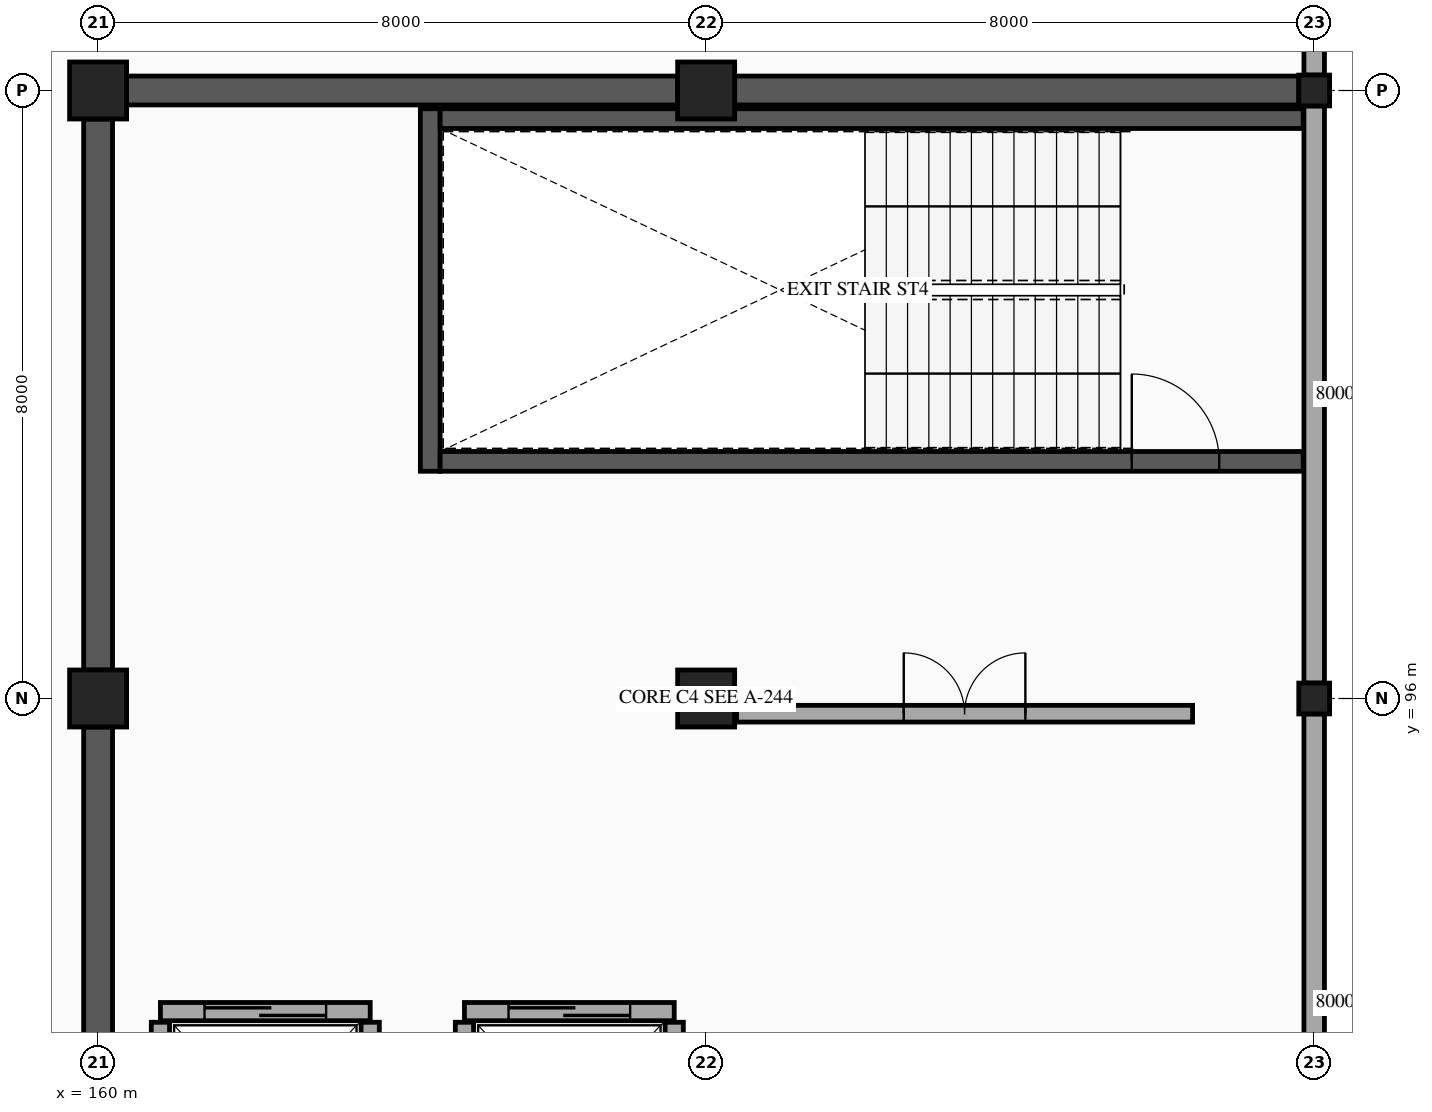
"""IFC4 building model, lengths in metres.
Left out: names, types, materials, properties, quantities, classifications, styles, units other than length and angle.
Written with IfcOpenShell. Run it as: python <this file> out.ifc"""

import sys

from ifc_helpers import new_model, si_unit, direction, frame, frame_2d, origin, origin_2d, place, context, subcontext, project, spatial, rectangle, hollow_rectangle, extrude, element, fill, save


model = new_model("IFC4")
c1 = context("Model", 3, precision=1e-05, world=origin(), true_north=direction((0.0, 1.0)))
c2 = subcontext(c1, "Body", "Model", "MODEL_VIEW")
j1 = project(units=[si_unit("LENGTHUNIT", "METRE"), si_unit("PLANEANGLEUNIT", "RADIAN")], contexts=[c1])
p1 = place(None, origin())
s1 = spatial("IfcSite", under=j1, at=p1, CompositionType="ELEMENT")
p2 = place(p1, origin())
s2 = spatial("IfcBuilding", under=s1, at=p2, CompositionType="ELEMENT")
p3 = place(p2, frame((0.0, 0.0, 28.4)))
s3 = spatial("IfcBuildingStorey", under=s2, at=p3, CompositionType="ELEMENT", Elevation=28.4)
for number, where, z_axis, x_axis in (
    (1, (160.0, 96.0, 0.0), (0.0, 0.0, 1.0), (1.0, 0.0, 0.0)),
    (2, (160.0, 104.0, 0.0), (0.0, 0.0, 1.0), (1.0, 0.0, 0.0)),
    (3, (168.0, 96.0, 0.0), (0.0, 0.0, 1.0), (1.0, 0.0, 0.0)),
    (4, (168.0, 104.0, 0.0), (0.0, 0.0, 1.0), (1.0, 0.0, 0.0)),
):
    element("IfcColumn", number, at=place(p3, frame(where, z_axis=z_axis, x_axis=x_axis)), inside=s3, PredefinedType="COLUMN", context=c2, shape_type="SweptSolid", body=[
        extrude(rectangle(XDim=0.75, YDim=0.75, at=origin_2d()), origin(), (0.0, 0.0, 1.0), 4.5),
    ])
for number, where, z_axis, x_axis in (
    (5, (176.0, 96.0, 0.0), (0.0, 0.0, 1.0), (1.0, 0.0, 0.0)),
    (6, (176.0, 104.0, 0.0), (0.0, 0.0, 1.0), (1.0, 0.0, 0.0)),
):
    element("IfcColumn", number, at=place(p3, frame(where, z_axis=z_axis, x_axis=x_axis)), inside=s3, PredefinedType="COLUMN", context=c2, shape_type="SweptSolid", body=[
        extrude(hollow_rectangle(XDim=0.406, YDim=0.406, WallThickness=0.015, InnerFilletRadius=0.015, OuterFilletRadius=0.029, at=origin_2d()), origin(), (0.0, 0.0, 1.0), 4.5),
    ])
for number, where, z_axis, x_axis in (
    (7, (176.0, 111.797, 0.0), (0.0, 0.0, 1.0), (0.0, -1.0, 0.0)),
    (8, (176.0, 103.797, 0.0), (0.0, 0.0, 1.0), (0.0, -1.0, 0.0)),
    (9, (176.0, 95.797, 0.0), (0.0, 0.0, 1.0), (0.0, -1.0, 0.0)),
):
    element("IfcWall", number, at=place(p3, frame(where, z_axis=z_axis, x_axis=x_axis)), inside=s3, PredefinedType="STANDARD", context=c2, shape_type="SweptSolid", body=[
        extrude(rectangle(XDim=7.594, YDim=0.27, at=frame_2d((3.797, 0.0))), origin(), (0.0, 0.0, 1.0), 3.48),
    ])
p4 = place(p3, frame((164.37, 98.99, 0.0), z_axis=(0.0, 0.0, 1.0), x_axis=(0.0, 1.0, 0.0)))
e10 = element("IfcWall", 10, at=p4, inside=s3, PredefinedType="SHEAR", context=c2, shape_type="SweptSolid", body=[
    extrude(rectangle(XDim=4.77, YDim=0.26, at=frame_2d((2.385, 0.0))), origin(), (0.0, 0.0, 1.0), 4.28),
])
p5 = place(p3, frame((164.5, 99.12, 0.0), z_axis=(0.0, 0.0, 1.0), x_axis=(1.0, 0.0, 0.0)))
e11 = element("IfcWall", 11, at=p5, inside=s3, PredefinedType="SHEAR", context=c2, shape_type="SweptSolid", body=[
    extrude(rectangle(XDim=11.355, YDim=0.26, at=frame_2d((5.677, 0.0))), origin(), (0.0, 0.0, 1.0), 4.28),
])
p6 = place(p5, frame((9.1, 0.0, 0.0)))
e12 = element("IfcOpeningElement", 12, at=p6, cuts=e11, PredefinedType="OPENING", context=c2, shape_type="SweptSolid", body=[
    extrude(rectangle(XDim=1.15, YDim=2.15, at=frame_2d((0.575, 1.075))), frame((0.0, 0.14, 0.0), z_axis=(0.0, -1.0, 0.0), x_axis=(1.0, 0.0, 0.0)), (0.0, 0.0, 1.0), 0.28),
])
p7 = place(p3, frame((164.5, 103.63, 0.0), z_axis=(0.0, 0.0, 1.0), x_axis=(1.0, 0.0, 0.0)))
e13 = element("IfcWall", 13, at=p7, inside=s3, PredefinedType="SHEAR", context=c2, shape_type="SweptSolid", body=[
    extrude(rectangle(XDim=11.355, YDim=0.26, at=frame_2d((5.677, 0.0))), origin(), (0.0, 0.0, 1.0), 4.28),
])
p8 = place(p3, frame((160.375, 104.0, 0.0), z_axis=(0.0, 0.0, 1.0), x_axis=(1.0, 0.0, 0.0)))
e14 = element("IfcWall", 14, at=p8, inside=s3, PredefinedType="SHEAR", context=c2, shape_type="SweptSolid", body=[
    extrude(rectangle(XDim=7.25, YDim=0.38, at=frame_2d((3.625, 0.0))), origin(), (0.0, 0.0, 1.0), 4.28),
])
p9 = place(p3, frame((168.375, 104.0, 0.0), z_axis=(0.0, 0.0, 1.0), x_axis=(1.0, 0.0, 0.0)))
e15 = element("IfcWall", 15, at=p9, inside=s3, PredefinedType="SHEAR", context=c2, shape_type="SweptSolid", body=[
    extrude(rectangle(XDim=7.422, YDim=0.38, at=frame_2d((3.711, 0.0))), origin(), (0.0, 0.0, 1.0), 4.28),
])
for number, where, z_axis, x_axis in (
    (16, (160.0, 88.375, 0.0), (0.0, 0.0, 1.0), (0.0, 1.0, 0.0)),
    (17, (160.0, 96.375, 0.0), (0.0, 0.0, 1.0), (0.0, 1.0, 0.0)),
):
    element("IfcWall", number, at=place(p3, frame(where, z_axis=z_axis, x_axis=x_axis)), inside=s3, PredefinedType="SHEAR", context=c2, shape_type="SweptSolid", body=[
        extrude(rectangle(XDim=7.25, YDim=0.38, at=frame_2d((3.625, 0.0))), origin(), (0.0, 0.0, 1.0), 4.28),
    ])
p10 = place(p3, frame((164.82, 91.88, 0.0), z_axis=(0.0, 0.0, 1.0), x_axis=(1.0, 0.0, 0.0)))
e18 = element("IfcWall", 18, at=p10, inside=s3, PredefinedType="PARTITIONING", context=c2, shape_type="SweptSolid", body=[
    extrude(rectangle(XDim=2.76, YDim=0.24, at=frame_2d((1.38, 0.0))), origin(), (0.0, 0.0, 1.0), 4.28),
])
p11 = place(p10, frame((0.58, 0.0, 0.0)))
e19 = element("IfcOpeningElement", 19, at=p11, cuts=e18, PredefinedType="OPENING", context=c2, shape_type="SweptSolid", body=[
    extrude(rectangle(XDim=1.6, YDim=2.3, at=frame_2d((0.8, 1.15))), frame((0.0, 0.13, 0.0), z_axis=(0.0, -1.0, 0.0), x_axis=(1.0, 0.0, 0.0)), (0.0, 0.0, 1.0), 0.26),
])
for number, where, z_axis, x_axis in (
    (20, (164.82, 89.06, 0.0), (0.0, 0.0, 1.0), (0.0, 1.0, 0.0)),
    (21, (167.58, 89.06, 0.0), (0.0, 0.0, 1.0), (0.0, 1.0, 0.0)),
):
    element("IfcWall", number, at=place(p3, frame(where, z_axis=z_axis, x_axis=x_axis)), inside=s3, PredefinedType="PARTITIONING", context=c2, shape_type="SweptSolid", body=[
        extrude(rectangle(XDim=2.68, YDim=0.24, at=frame_2d((1.34, 0.0))), origin(), (0.0, 0.0, 1.0), 4.28),
    ])
p12 = place(p3, frame((160.82, 91.88, 0.0), z_axis=(0.0, 0.0, 1.0), x_axis=(1.0, 0.0, 0.0)))
e22 = element("IfcWall", 22, at=p12, inside=s3, PredefinedType="PARTITIONING", context=c2, shape_type="SweptSolid", body=[
    extrude(rectangle(XDim=2.76, YDim=0.24, at=frame_2d((1.38, 0.0))), origin(), (0.0, 0.0, 1.0), 4.28),
])
p13 = place(p12, frame((0.58, 0.0, 0.0)))
e23 = element("IfcOpeningElement", 23, at=p13, cuts=e22, PredefinedType="OPENING", context=c2, shape_type="SweptSolid", body=[
    extrude(rectangle(XDim=1.6, YDim=2.3, at=frame_2d((0.8, 1.15))), frame((0.0, 0.13, 0.0), z_axis=(0.0, -1.0, 0.0), x_axis=(1.0, 0.0, 0.0)), (0.0, 0.0, 1.0), 0.26),
])
for number, where, z_axis, x_axis in (
    (24, (160.82, 89.06, 0.0), (0.0, 0.0, 1.0), (0.0, 1.0, 0.0)),
    (25, (163.58, 89.06, 0.0), (0.0, 0.0, 1.0), (0.0, 1.0, 0.0)),
):
    element("IfcWall", number, at=place(p3, frame(where, z_axis=z_axis, x_axis=x_axis)), inside=s3, PredefinedType="PARTITIONING", context=c2, shape_type="SweptSolid", body=[
        extrude(rectangle(XDim=2.68, YDim=0.24, at=frame_2d((1.34, 0.0))), origin(), (0.0, 0.0, 1.0), 4.28),
    ])
p14 = place(p3, frame((168.4, 95.8, 0.0), z_axis=(0.0, 0.0, 1.0), x_axis=(1.0, 0.0, 0.0)))
e26 = element("IfcWall", 26, at=p14, inside=s3, PredefinedType="PARTITIONING", context=c2, shape_type="SweptSolid", body=[
    extrude(rectangle(XDim=6.0, YDim=0.22, at=frame_2d((3.0, 0.0))), origin(), (0.0, 0.0, 1.0), 3.48),
])
p15 = place(p14, frame((2.2, 0.0, 0.0)))
e27 = element("IfcOpeningElement", 27, at=p15, cuts=e26, PredefinedType="OPENING", context=c2, shape_type="SweptSolid", body=[
    extrude(rectangle(XDim=1.6, YDim=2.15, at=frame_2d((0.8, 1.075))), frame((0.0, 0.12, 0.0), z_axis=(0.0, -1.0, 0.0), x_axis=(1.0, 0.0, 0.0)), (0.0, 0.0, 1.0), 0.24),
])
p16 = place(p6, origin())
e28 = element("IfcDoor", 28, at=p16, inside=s3, OperationType="SINGLE_SWING_LEFT", PredefinedType="DOOR", context=c2, shape_type="SweptSolid", body=[
    extrude(rectangle(XDim=1.15, YDim=2.15, at=frame_2d((0.575, 1.075))), frame((0.0, 0.025, 0.0), z_axis=(0.0, -1.0, 0.0), x_axis=(1.0, 0.0, 0.0)), (0.0, 0.0, 1.0), 0.05),
])
fill(e12, e28)
p17 = place(p11, origin())
e29 = element("IfcDoor", 29, at=p17, inside=s3, OperationType="SLIDING_TO_LEFT", PredefinedType="DOOR", context=c2, shape_type="SweptSolid", body=[
    extrude(rectangle(XDim=1.6, YDim=2.3, at=frame_2d((0.8, 1.15))), frame((0.0, 0.025, 0.0), z_axis=(0.0, -1.0, 0.0), x_axis=(1.0, 0.0, 0.0)), (0.0, 0.0, 1.0), 0.05),
])
fill(e19, e29)
p18 = place(p13, origin())
e30 = element("IfcDoor", 30, at=p18, inside=s3, OperationType="SLIDING_TO_LEFT", PredefinedType="DOOR", context=c2, shape_type="SweptSolid", body=[
    extrude(rectangle(XDim=1.6, YDim=2.3, at=frame_2d((0.8, 1.15))), frame((0.0, 0.025, 0.0), z_axis=(0.0, -1.0, 0.0), x_axis=(1.0, 0.0, 0.0)), (0.0, 0.0, 1.0), 0.05),
])
fill(e23, e30)
p19 = place(p15, origin())
e31 = element("IfcDoor", 31, at=p19, inside=s3, OperationType="DOUBLE_DOOR_SINGLE_SWING", PredefinedType="DOOR", context=c2, shape_type="SweptSolid", body=[
    extrude(rectangle(XDim=1.6, YDim=2.15, at=frame_2d((0.8, 1.075))), frame((0.0, 0.025, 0.0), z_axis=(0.0, -1.0, 0.0), x_axis=(1.0, 0.0, 0.0)), (0.0, 0.0, 1.0), 0.05),
])
fill(e27, e31)
save(model, sys.argv[1])
